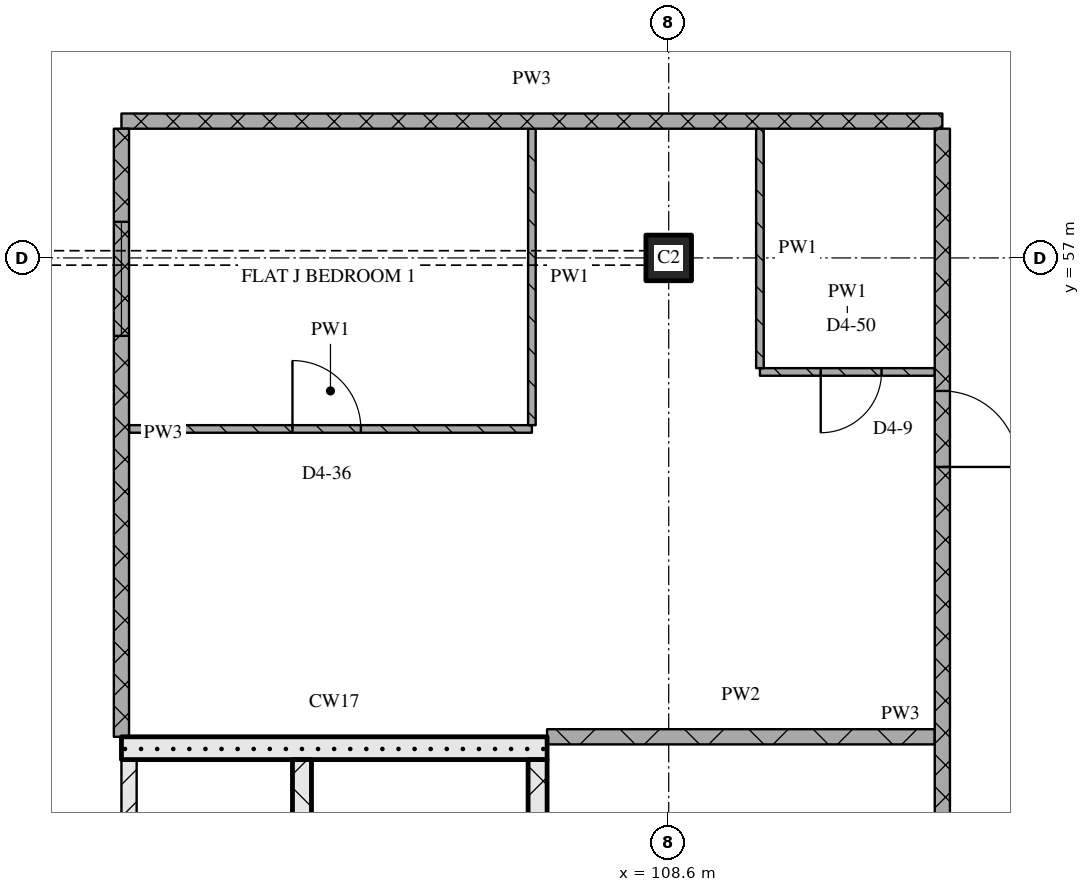
"""IFC4 building model, lengths in metres.
Left out: names, types, materials, properties, quantities, classifications, styles, units other than length and angle.
Written with IfcOpenShell. Run it as: python <this file> out.ifc"""

import sys

from ifc_helpers import new_model, si_unit, direction, frame, frame_2d, origin, origin_2d, place, context, subcontext, project, spatial, rectangle, extrude, element, fill, save


model = new_model("IFC4")
c1 = context("Model", 3, precision=1e-05, world=origin(), true_north=direction((0.0, 1.0)))
c2 = subcontext(c1, "Body", "Model", "MODEL_VIEW")
j1 = project(units=[si_unit("LENGTHUNIT", "METRE"), si_unit("PLANEANGLEUNIT", "RADIAN")], contexts=[c1])
p1 = place(None, origin())
s1 = spatial("IfcSite", under=j1, at=p1, CompositionType="ELEMENT")
p2 = place(p1, origin())
s2 = spatial("IfcBuilding", under=s1, at=p2, CompositionType="ELEMENT")
p3 = place(p2, frame((0.0, 0.0, 237.9)))
s3 = spatial("IfcBuildingStorey", under=s2, at=p3, CompositionType="ELEMENT", Elevation=237.9)
p4 = place(p3, frame((108.6, 57.0, 0.0), z_axis=(0.0, 0.0, 1.0), x_axis=(1.0, 0.0, 0.0)))
e1 = element("IfcColumn", 1, at=p4, inside=s3, PredefinedType="COLUMN", context=c2, shape_type="SweptSolid", body=[
    extrude(rectangle(XDim=0.6, YDim=0.6, at=origin_2d()), origin(), (0.0, 0.0, 1.0), 3.6),
])
p5 = place(p3, frame((101.5, 43.5, 0.0), z_axis=(0.0, 0.0, 1.0), x_axis=(0.0, 1.0, 0.0)))
e2 = element("IfcWall", 2, at=p5, inside=s3, PredefinedType="PARTITIONING", context=c2, shape_type="SweptSolid", body=[
    extrude(rectangle(XDim=6.9, YDim=0.2, at=frame_2d((3.45, 0.0))), origin(), (0.0, 0.0, 1.0), 3.32),
])
p6 = place(p5, frame((1.0, 0.0, 0.0)))
e3 = element("IfcOpeningElement", 3, at=p6, cuts=e2, PredefinedType="OPENING", context=c2, shape_type="SweptSolid", body=[
    extrude(rectangle(XDim=1.0, YDim=2.1, at=frame_2d((0.5, 1.05))), frame((0.0, 0.11, 0.0), z_axis=(0.0, -1.0, 0.0), x_axis=(1.0, 0.0, 0.0)), (0.0, 0.0, 1.0), 0.22),
])
p7 = place(p3, frame((103.775, 43.5, 0.0), z_axis=(0.0, 0.0, 1.0), x_axis=(0.0, 1.0, 0.0)))
e4 = element("IfcWall", 4, at=p7, inside=s3, PredefinedType="SOLIDWALL", context=c2, shape_type="SweptSolid", body=[
    extrude(rectangle(XDim=6.9, YDim=0.25, at=frame_2d((3.45, 0.0))), origin(), (0.0, 0.0, 1.0), 3.32),
])
p8 = place(p7, frame((0.2, 0.0, 0.0)))
e5 = element("IfcOpeningElement", 5, at=p8, cuts=e4, PredefinedType="OPENING", context=c2, shape_type="SweptSolid", body=[
    extrude(rectangle(XDim=1.0, YDim=2.1, at=frame_2d((0.5, 1.05))), frame((0.0, 0.135, 0.0), z_axis=(0.0, -1.0, 0.0), x_axis=(1.0, 0.0, 0.0)), (0.0, 0.0, 1.0), 0.27),
])
p9 = place(p3, frame((106.875, 43.5, 0.0), z_axis=(0.0, 0.0, 1.0), x_axis=(0.0, 1.0, 0.0)))
e6 = element("IfcWall", 6, at=p9, inside=s3, PredefinedType="SOLIDWALL", context=c2, shape_type="SweptSolid", body=[
    extrude(rectangle(XDim=6.9, YDim=0.25, at=frame_2d((3.45, 0.0))), origin(), (0.0, 0.0, 1.0), 3.32),
])
p10 = place(p3, frame((101.4, 50.55, 0.0), z_axis=(0.0, 0.0, 1.0), x_axis=(1.0, 0.0, 0.0)))
e7 = element("IfcWall", 7, at=p10, inside=s3, PredefinedType="SOLIDWALL", context=c2, shape_type="SweptSolid", body=[
    extrude(rectangle(XDim=5.6, YDim=0.3, at=frame_2d((2.8, 0.0))), origin(), (0.0, 0.0, 1.0), 3.32),
])
p11 = place(p3, frame((107.0, 50.7, 0.0), z_axis=(0.0, 0.0, 1.0), x_axis=(1.0, 0.0, 0.0)))
e8 = element("IfcWall", 8, at=p11, inside=s3, PredefinedType="PARTITIONING", context=c2, shape_type="SweptSolid", body=[
    extrude(rectangle(XDim=5.1, YDim=0.2, at=frame_2d((2.55, 0.0))), origin(), (0.0, 0.0, 1.0), 3.32),
])
p12 = place(p3, frame((101.5, 54.75, 0.0), z_axis=(0.0, 0.0, 1.0), x_axis=(1.0, 0.0, 0.0)))
e9 = element("IfcWall", 9, at=p12, inside=s3, PredefinedType="PARTITIONING", context=c2, shape_type="SweptSolid", body=[
    extrude(rectangle(XDim=5.3, YDim=0.1, at=frame_2d((2.65, 0.0))), origin(), (0.0, 0.0, 1.0), 3.32),
])
p13 = place(p12, frame((2.15, 0.0, 0.0)))
e10 = element("IfcOpeningElement", 10, at=p13, cuts=e9, PredefinedType="OPENING", context=c2, shape_type="SweptSolid", body=[
    extrude(rectangle(XDim=0.9, YDim=2.1, at=frame_2d((0.45, 1.05))), frame((0.0, 0.06, 0.0), z_axis=(0.0, -1.0, 0.0), x_axis=(1.0, 0.0, 0.0)), (0.0, 0.0, 1.0), 0.12),
])
p14 = place(p3, frame((109.8, 55.5, 0.0), z_axis=(0.0, 0.0, 1.0), x_axis=(1.0, 0.0, 0.0)))
e11 = element("IfcWall", 11, at=p14, inside=s3, PredefinedType="PARTITIONING", context=c2, shape_type="SweptSolid", body=[
    extrude(rectangle(XDim=2.3, YDim=0.1, at=frame_2d((1.15, 0.0))), origin(), (0.0, 0.0, 1.0), 3.32),
])
p15 = place(p14, frame((0.8, 0.0, 0.0)))
e12 = element("IfcOpeningElement", 12, at=p15, cuts=e11, PredefinedType="OPENING", context=c2, shape_type="SweptSolid", body=[
    extrude(rectangle(XDim=0.8, YDim=2.1, at=frame_2d((0.4, 1.05))), frame((0.0, 0.06, 0.0), z_axis=(0.0, -1.0, 0.0), x_axis=(1.0, 0.0, 0.0)), (0.0, 0.0, 1.0), 0.12),
])
p16 = place(p3, frame((101.4, 58.8, 0.0), z_axis=(0.0, 0.0, 1.0), x_axis=(1.0, 0.0, 0.0)))
e13 = element("IfcWall", 13, at=p16, inside=s3, PredefinedType="PARTITIONING", context=c2, shape_type="SweptSolid", body=[
    extrude(rectangle(XDim=10.8, YDim=0.2, at=frame_2d((5.4, 0.0))), origin(), (0.0, 0.0, 1.0), 3.32),
])
p17 = place(p3, frame((101.4, 58.7, 0.0), z_axis=(0.0, 0.0, 1.0), x_axis=(0.0, -1.0, 0.0)))
e14 = element("IfcWall", 14, at=p17, inside=s3, PredefinedType="PARTITIONING", context=c2, shape_type="SweptSolid", body=[
    extrude(rectangle(XDim=8.0, YDim=0.2, at=frame_2d((4.0, 0.0))), origin(), (0.0, 0.0, 1.0), 3.32),
])
p18 = place(p17, frame((1.225, 0.0, 0.9)))
e15 = element("IfcOpeningElement", 15, at=p18, cuts=e14, PredefinedType="OPENING", context=c2, shape_type="SweptSolid", body=[
    extrude(rectangle(XDim=1.5, YDim=1.5, at=frame_2d((0.75, 0.75))), frame((0.0, 0.11, 0.0), z_axis=(0.0, -1.0, 0.0), x_axis=(1.0, 0.0, 0.0)), (0.0, 0.0, 1.0), 0.22),
])
p19 = place(p3, frame((106.8, 58.7, 0.0), z_axis=(0.0, 0.0, 1.0), x_axis=(0.0, -1.0, 0.0)))
e16 = element("IfcWall", 16, at=p19, inside=s3, PredefinedType="PARTITIONING", context=c2, shape_type="SweptSolid", body=[
    extrude(rectangle(XDim=3.9, YDim=0.1, at=frame_2d((1.95, 0.0))), origin(), (0.0, 0.0, 1.0), 3.32),
])
p20 = place(p3, frame((109.8, 58.7, 0.0), z_axis=(0.0, 0.0, 1.0), x_axis=(0.0, -1.0, 0.0)))
e17 = element("IfcWall", 17, at=p20, inside=s3, PredefinedType="PARTITIONING", context=c2, shape_type="SweptSolid", body=[
    extrude(rectangle(XDim=3.15, YDim=0.1, at=frame_2d((1.575, 0.0))), origin(), (0.0, 0.0, 1.0), 3.32),
])
p21 = place(p3, frame((112.2, 43.3, 0.0), z_axis=(0.0, 0.0, 1.0), x_axis=(0.0, 1.0, 0.0)))
e18 = element("IfcWall", 18, at=p21, inside=s3, PredefinedType="PARTITIONING", context=c2, shape_type="SweptSolid", body=[
    extrude(rectangle(XDim=15.4, YDim=0.2, at=frame_2d((7.7, 0.0))), origin(), (0.0, 0.0, 1.0), 3.32),
])
p22 = place(p21, frame((10.95, 0.0, 0.0)))
e19 = element("IfcOpeningElement", 19, at=p22, cuts=e18, PredefinedType="OPENING", context=c2, shape_type="SweptSolid", body=[
    extrude(rectangle(XDim=1.0, YDim=2.1, at=frame_2d((0.5, 1.05))), frame((0.0, 0.11, 0.0), z_axis=(0.0, -1.0, 0.0), x_axis=(1.0, 0.0, 0.0)), (0.0, 0.0, 1.0), 0.22),
])
p23 = place(p13, origin())
e20 = element("IfcDoor", 20, at=p23, inside=s3, OperationType="SINGLE_SWING_LEFT", PredefinedType="DOOR", context=c2, shape_type="SweptSolid", body=[
    extrude(rectangle(XDim=0.9, YDim=2.1, at=frame_2d((0.45, 1.05))), frame((0.0, 0.025, 0.0), z_axis=(0.0, -1.0, 0.0), x_axis=(1.0, 0.0, 0.0)), (0.0, 0.0, 1.0), 0.05),
])
fill(e10, e20)
p24 = place(p15, origin())
e21 = element("IfcDoor", 21, at=p24, inside=s3, OperationType="SINGLE_SWING_RIGHT", PredefinedType="DOOR", context=c2, shape_type="SweptSolid", body=[
    extrude(rectangle(XDim=0.8, YDim=2.1, at=frame_2d((0.4, 1.05))), frame((0.0, 0.025, 0.0), z_axis=(0.0, -1.0, 0.0), x_axis=(1.0, 0.0, 0.0)), (0.0, 0.0, 1.0), 0.05),
])
fill(e12, e21)
p25 = place(p22, origin())
e22 = element("IfcDoor", 22, at=p25, inside=s3, OperationType="SINGLE_SWING_RIGHT", PredefinedType="DOOR", context=c2, shape_type="SweptSolid", body=[
    extrude(rectangle(XDim=1.0, YDim=2.1, at=frame_2d((0.5, 1.05))), frame((0.0, 0.025, 0.0), z_axis=(0.0, -1.0, 0.0), x_axis=(1.0, 0.0, 0.0)), (0.0, 0.0, 1.0), 0.05),
])
fill(e19, e22)
p26 = place(p18, origin())
e23 = element("IfcWindow", 23, at=p26, inside=s3, PartitioningType="SINGLE_PANEL", PredefinedType="WINDOW", context=c2, shape_type="SweptSolid", body=[
    extrude(rectangle(XDim=1.5, YDim=1.5, at=frame_2d((0.75, 0.75))), frame((0.0, 0.03, 0.0), z_axis=(0.0, -1.0, 0.0), x_axis=(1.0, 0.0, 0.0)), (0.0, 0.0, 1.0), 0.06),
])
fill(e15, e23)
save(model, sys.argv[1])
